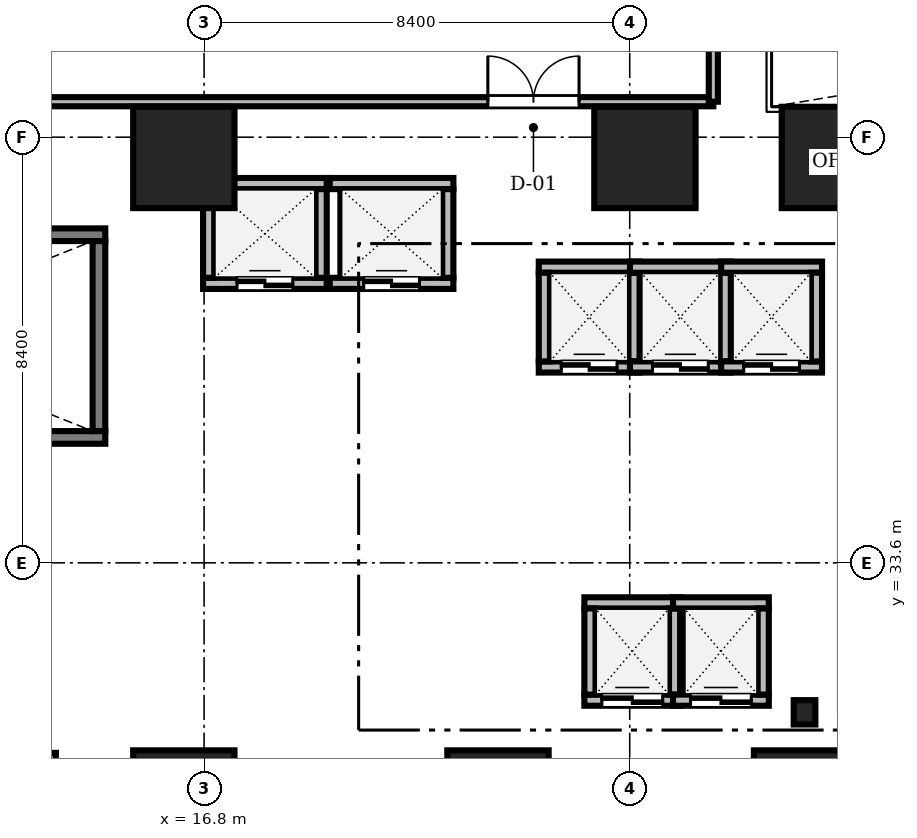
"""IFC4 building model, lengths in metres.
Left out: names, types, materials, properties, quantities, classifications, styles, units other than length and angle.
Written with IfcOpenShell. Run it as: python <this file> out.ifc"""

import sys

from ifc_helpers import new_model, si_unit, direction, frame, frame_2d, origin, origin_2d, place, context, subcontext, project, spatial, rectangle, i_section, extrude, source, transform, mapped, element, fill, save


model = new_model("IFC4")
c1 = context("Model", 3, precision=1e-05, world=origin(), true_north=direction((0.0, 1.0)))
c2 = subcontext(c1, "Body", "Model", "MODEL_VIEW")
j1 = project(units=[si_unit("LENGTHUNIT", "METRE"), si_unit("PLANEANGLEUNIT", "RADIAN")], contexts=[c1])
p1 = place(None, origin())
s1 = spatial("IfcSite", under=j1, at=p1, CompositionType="ELEMENT")
p2 = place(p1, origin())
s2 = spatial("IfcBuilding", under=s1, at=p2, CompositionType="ELEMENT")
p3 = place(p2, origin())
s3 = spatial("IfcBuildingStorey", under=s2, at=p3, CompositionType="ELEMENT", Elevation=0.0)
m1 = source(origin(), c2, "Body", "SweptSolid", [
    extrude(i_section(OverallWidth=0.428, OverallDepth=0.481, WebThickness=0.04, FlangeThickness=0.063, FilletRadius=0.015, at=origin_2d()), origin(), (0.0, 0.0, 1.0), 5.68),
])
p4 = place(p3, frame((28.65, 30.65, 0.0), z_axis=(0.0, 0.0, 1.0), x_axis=(1.0, 0.0, 0.0)))
e1 = element("IfcColumn", 1, at=p4, inside=s3, PredefinedType="COLUMN", context=c2, shape_type="MappedRepresentation", body=[
    mapped(m1, transform((0.0, 0.0, 0.0), scale=1.0)),
])
m2 = source(origin(), c2, "Body", "SweptSolid", [
    extrude(rectangle(XDim=2.0, YDim=2.0, at=origin_2d()), origin(), (0.0, 0.0, 1.0), 5.68),
])
for number, where, z_axis, x_axis in (
    (2, (16.4, 28.9, 0.0), (0.0, 0.0, 1.0), (1.0, 0.0, 0.0)),
    (3, (22.6, 28.9, 0.0), (0.0, 0.0, 1.0), (1.0, 0.0, 0.0)),
    (4, (28.65, 28.9, 0.0), (0.0, 0.0, 1.0), (1.0, 0.0, 0.0)),
    (5, (16.4, 41.6, 0.0), (0.0, 0.0, 1.0), (1.0, 0.0, 0.0)),
    (6, (25.5, 41.6, 0.0), (0.0, 0.0, 1.0), (1.0, 0.0, 0.0)),
    (7, (29.2, 41.6, 0.0), (0.0, 0.0, 1.0), (1.0, 0.0, 0.0)),
):
    element("IfcColumn", number, at=place(p3, frame(where, z_axis=z_axis, x_axis=x_axis)), inside=s3, PredefinedType="COLUMN", context=c2, shape_type="MappedRepresentation", body=[
        mapped(m2, transform((0.0, 0.0, 0.0), scale=1.0)),
    ])
m3 = source(origin(), c2, "Body", "SweptSolid", [
    extrude(rectangle(XDim=9.9, YDim=0.25, at=frame_2d((4.95, 0.0))), origin(), (0.0, 0.0, 1.0), 5.8),
])
for number, where, z_axis, x_axis in (
    (8, (4.95, 36.075, 0.0), (0.0, 0.0, 1.0), (1.0, 0.0, 0.0)),
    (9, (4.95, 40.075, 0.0), (0.0, 0.0, 1.0), (1.0, 0.0, 0.0)),
):
    element("IfcWall", number, at=place(p3, frame(where, z_axis=z_axis, x_axis=x_axis)), inside=s3, PredefinedType="SOLIDWALL", context=c2, shape_type="MappedRepresentation", body=[
        mapped(m3, transform((0.0, 0.0, 0.0), scale=1.0)),
    ])
m4 = source(origin(), c2, "Body", "SweptSolid", [
    extrude(rectangle(XDim=3.75, YDim=0.25, at=frame_2d((1.875, 0.0))), origin(), (0.0, 0.0, 1.0), 5.8),
])
p5 = place(p3, frame((14.725, 36.2, 0.0), z_axis=(0.0, 0.0, 1.0), x_axis=(0.0, 1.0, 0.0)))
e10 = element("IfcWall", 10, at=p5, inside=s3, PredefinedType="SOLIDWALL", context=c2, shape_type="MappedRepresentation", body=[
    mapped(m4, transform((0.0, 0.0, 0.0), scale=1.0)),
])
m5 = source(origin(), c2, "Body", "SweptSolid", [
    extrude(rectangle(XDim=2.44, YDim=0.22, at=frame_2d((1.22, 0.0))), origin(), (0.0, 0.0, 1.0), 5.68),
])
p6 = place(p3, frame((16.78, 39.115, 0.0), z_axis=(0.0, 0.0, 1.0), x_axis=(1.0, 0.0, 0.0)))
e11 = element("IfcWall", 11, at=p6, inside=s3, PredefinedType="SOLIDWALL", context=c2, shape_type="MappedRepresentation", body=[
    mapped(m5, transform((0.0, 0.0, 0.0), scale=1.0)),
])
m6 = source(origin(), c2, "Body", "SweptSolid", [
    extrude(rectangle(XDim=1.1, YDim=2.2, at=frame_2d((0.55, 1.1))), frame((0.0, 0.12, 0.0), z_axis=(0.0, -1.0, 0.0), x_axis=(1.0, 0.0, 0.0)), (0.0, 0.0, 1.0), 0.24),
])
p7 = place(p6, frame((0.67, 0.0, 0.0)))
e12 = element("IfcOpeningElement", 12, at=p7, cuts=e11, PredefinedType="OPENING", context=c2, shape_type="MappedRepresentation", body=[
    mapped(m6, transform((0.0, 0.0, 0.0), scale=1.0)),
])
p8 = place(p3, frame((16.78, 41.085, 0.0), z_axis=(0.0, 0.0, 1.0), x_axis=(1.0, 0.0, 0.0)))
e13 = element("IfcWall", 13, at=p8, inside=s3, PredefinedType="SOLIDWALL", context=c2, shape_type="MappedRepresentation", body=[
    mapped(m5, transform((0.0, 0.0, 0.0), scale=1.0)),
])
m7 = source(origin(), c2, "Body", "SweptSolid", [
    extrude(rectangle(XDim=1.75, YDim=0.22, at=frame_2d((0.875, 0.0))), origin(), (0.0, 0.0, 1.0), 5.68),
])
for number, where, z_axis, x_axis in (
    (14, (16.89, 39.225, 0.0), (0.0, 0.0, 1.0), (0.0, 1.0, 0.0)),
    (15, (19.11, 39.225, 0.0), (0.0, 0.0, 1.0), (0.0, 1.0, 0.0)),
):
    element("IfcWall", number, at=place(p3, frame(where, z_axis=z_axis, x_axis=x_axis)), inside=s3, PredefinedType="SOLIDWALL", context=c2, shape_type="MappedRepresentation", body=[
        mapped(m7, transform((0.0, 0.0, 0.0), scale=1.0)),
    ])
p9 = place(p3, frame((19.28, 39.115, 0.0), z_axis=(0.0, 0.0, 1.0), x_axis=(1.0, 0.0, 0.0)))
e16 = element("IfcWall", 16, at=p9, inside=s3, PredefinedType="SOLIDWALL", context=c2, shape_type="MappedRepresentation", body=[
    mapped(m5, transform((0.0, 0.0, 0.0), scale=1.0)),
])
p10 = place(p9, frame((0.67, 0.0, 0.0)))
e17 = element("IfcOpeningElement", 17, at=p10, cuts=e16, PredefinedType="OPENING", context=c2, shape_type="MappedRepresentation", body=[
    mapped(m6, transform((0.0, 0.0, 0.0), scale=1.0)),
])
p11 = place(p3, frame((19.28, 41.085, 0.0), z_axis=(0.0, 0.0, 1.0), x_axis=(1.0, 0.0, 0.0)))
e18 = element("IfcWall", 18, at=p11, inside=s3, PredefinedType="SOLIDWALL", context=c2, shape_type="MappedRepresentation", body=[
    mapped(m5, transform((0.0, 0.0, 0.0), scale=1.0)),
])
p12 = place(p3, frame((21.61, 39.225, 0.0), z_axis=(0.0, 0.0, 1.0), x_axis=(0.0, 1.0, 0.0)))
e19 = element("IfcWall", 19, at=p12, inside=s3, PredefinedType="SOLIDWALL", context=c2, shape_type="MappedRepresentation", body=[
    mapped(m7, transform((0.0, 0.0, 0.0), scale=1.0)),
])
m8 = source(origin(), c2, "Body", "SweptSolid", [
    extrude(rectangle(XDim=1.99, YDim=0.22, at=frame_2d((0.995, 0.0))), origin(), (0.0, 0.0, 1.0), 5.68),
])
p13 = place(p3, frame((23.405, 37.465, 0.0), z_axis=(0.0, 0.0, 1.0), x_axis=(1.0, 0.0, 0.0)))
e20 = element("IfcWall", 20, at=p13, inside=s3, PredefinedType="SOLIDWALL", context=c2, shape_type="MappedRepresentation", body=[
    mapped(m8, transform((0.0, 0.0, 0.0), scale=1.0)),
])
p14 = place(p13, frame((0.445, 0.0, 0.0)))
e21 = element("IfcOpeningElement", 21, at=p14, cuts=e20, PredefinedType="OPENING", context=c2, shape_type="MappedRepresentation", body=[
    mapped(m6, transform((0.0, 0.0, 0.0), scale=1.0)),
])
p15 = place(p3, frame((23.405, 39.435, 0.0), z_axis=(0.0, 0.0, 1.0), x_axis=(1.0, 0.0, 0.0)))
e22 = element("IfcWall", 22, at=p15, inside=s3, PredefinedType="SOLIDWALL", context=c2, shape_type="MappedRepresentation", body=[
    mapped(m8, transform((0.0, 0.0, 0.0), scale=1.0)),
])
for number, where, z_axis, x_axis in (
    (23, (23.515, 37.575, 0.0), (0.0, 0.0, 1.0), (0.0, 1.0, 0.0)),
    (24, (25.285, 37.575, 0.0), (0.0, 0.0, 1.0), (0.0, 1.0, 0.0)),
):
    element("IfcWall", number, at=place(p3, frame(where, z_axis=z_axis, x_axis=x_axis)), inside=s3, PredefinedType="SOLIDWALL", context=c2, shape_type="MappedRepresentation", body=[
        mapped(m7, transform((0.0, 0.0, 0.0), scale=1.0)),
    ])
p16 = place(p3, frame((25.205, 37.465, 0.0), z_axis=(0.0, 0.0, 1.0), x_axis=(1.0, 0.0, 0.0)))
e25 = element("IfcWall", 25, at=p16, inside=s3, PredefinedType="SOLIDWALL", context=c2, shape_type="MappedRepresentation", body=[
    mapped(m8, transform((0.0, 0.0, 0.0), scale=1.0)),
])
p17 = place(p16, frame((0.445, 0.0, 0.0)))
e26 = element("IfcOpeningElement", 26, at=p17, cuts=e25, PredefinedType="OPENING", context=c2, shape_type="MappedRepresentation", body=[
    mapped(m6, transform((0.0, 0.0, 0.0), scale=1.0)),
])
p18 = place(p3, frame((25.205, 39.435, 0.0), z_axis=(0.0, 0.0, 1.0), x_axis=(1.0, 0.0, 0.0)))
e27 = element("IfcWall", 27, at=p18, inside=s3, PredefinedType="SOLIDWALL", context=c2, shape_type="MappedRepresentation", body=[
    mapped(m8, transform((0.0, 0.0, 0.0), scale=1.0)),
])
p19 = place(p3, frame((27.085, 37.575, 0.0), z_axis=(0.0, 0.0, 1.0), x_axis=(0.0, 1.0, 0.0)))
e28 = element("IfcWall", 28, at=p19, inside=s3, PredefinedType="SOLIDWALL", context=c2, shape_type="MappedRepresentation", body=[
    mapped(m7, transform((0.0, 0.0, 0.0), scale=1.0)),
])
m9 = source(origin(), c2, "Body", "SweptSolid", [
    extrude(rectangle(XDim=1.99, YDim=0.22, at=frame_2d((0.995, 0.0))), origin(), (0.0, 0.0, 1.0), 5.68),
])
p20 = place(p3, frame((27.005, 37.465, 0.0), z_axis=(0.0, 0.0, 1.0), x_axis=(1.0, 0.0, 0.0)))
e29 = element("IfcWall", 29, at=p20, inside=s3, PredefinedType="SOLIDWALL", context=c2, shape_type="MappedRepresentation", body=[
    mapped(m9, transform((0.0, 0.0, 0.0), scale=1.0)),
])
p21 = place(p20, frame((0.445, 0.0, 0.0)))
e30 = element("IfcOpeningElement", 30, at=p21, cuts=e29, PredefinedType="OPENING", context=c2, shape_type="MappedRepresentation", body=[
    mapped(m6, transform((0.0, 0.0, 0.0), scale=1.0)),
])
p22 = place(p3, frame((27.005, 39.435, 0.0), z_axis=(0.0, 0.0, 1.0), x_axis=(1.0, 0.0, 0.0)))
e31 = element("IfcWall", 31, at=p22, inside=s3, PredefinedType="SOLIDWALL", context=c2, shape_type="MappedRepresentation", body=[
    mapped(m9, transform((0.0, 0.0, 0.0), scale=1.0)),
])
p23 = place(p3, frame((28.885, 37.575, 0.0), z_axis=(0.0, 0.0, 1.0), x_axis=(0.0, 1.0, 0.0)))
e32 = element("IfcWall", 32, at=p23, inside=s3, PredefinedType="SOLIDWALL", context=c2, shape_type="MappedRepresentation", body=[
    mapped(m7, transform((0.0, 0.0, 0.0), scale=1.0)),
])
m10 = source(origin(), c2, "Body", "SweptSolid", [
    extrude(rectangle(XDim=1.89, YDim=0.22, at=frame_2d((0.945, 0.0))), origin(), (0.0, 0.0, 1.0), 5.68),
])
p24 = place(p3, frame((24.305, 30.89, 0.0), z_axis=(0.0, 0.0, 1.0), x_axis=(1.0, 0.0, 0.0)))
e33 = element("IfcWall", 33, at=p24, inside=s3, PredefinedType="SOLIDWALL", context=c2, shape_type="MappedRepresentation", body=[
    mapped(m10, transform((0.0, 0.0, 0.0), scale=1.0)),
])
m11 = source(origin(), c2, "Body", "SweptSolid", [
    extrude(rectangle(XDim=1.2, YDim=2.25, at=frame_2d((0.6, 1.125))), frame((0.0, 0.12, 0.0), z_axis=(0.0, -1.0, 0.0), x_axis=(1.0, 0.0, 0.0)), (0.0, 0.0, 1.0), 0.24),
])
p25 = place(p24, frame((0.345, 0.0, 0.0)))
e34 = element("IfcOpeningElement", 34, at=p25, cuts=e33, PredefinedType="OPENING", context=c2, shape_type="MappedRepresentation", body=[
    mapped(m11, transform((0.0, 0.0, 0.0), scale=1.0)),
])
p26 = place(p3, frame((24.305, 32.81, 0.0), z_axis=(0.0, 0.0, 1.0), x_axis=(1.0, 0.0, 0.0)))
e35 = element("IfcWall", 35, at=p26, inside=s3, PredefinedType="SOLIDWALL", context=c2, shape_type="MappedRepresentation", body=[
    mapped(m10, transform((0.0, 0.0, 0.0), scale=1.0)),
])
m12 = source(origin(), c2, "Body", "SweptSolid", [
    extrude(rectangle(XDim=1.7, YDim=0.22, at=frame_2d((0.85, 0.0))), origin(), (0.0, 0.0, 1.0), 5.68),
])
for number, where, z_axis, x_axis in (
    (36, (24.415, 31.0, 0.0), (0.0, 0.0, 1.0), (0.0, 1.0, 0.0)),
    (37, (26.085, 31.0, 0.0), (0.0, 0.0, 1.0), (0.0, 1.0, 0.0)),
):
    element("IfcWall", number, at=place(p3, frame(where, z_axis=z_axis, x_axis=x_axis)), inside=s3, PredefinedType="SOLIDWALL", context=c2, shape_type="MappedRepresentation", body=[
        mapped(m12, transform((0.0, 0.0, 0.0), scale=1.0)),
    ])
p27 = place(p3, frame((26.055, 30.89, 0.0), z_axis=(0.0, 0.0, 1.0), x_axis=(1.0, 0.0, 0.0)))
e38 = element("IfcWall", 38, at=p27, inside=s3, PredefinedType="SOLIDWALL", context=c2, shape_type="MappedRepresentation", body=[
    mapped(m10, transform((0.0, 0.0, 0.0), scale=1.0)),
])
p28 = place(p27, frame((0.345, 0.0, 0.0)))
e39 = element("IfcOpeningElement", 39, at=p28, cuts=e38, PredefinedType="OPENING", context=c2, shape_type="MappedRepresentation", body=[
    mapped(m11, transform((0.0, 0.0, 0.0), scale=1.0)),
])
p29 = place(p3, frame((26.055, 32.81, 0.0), z_axis=(0.0, 0.0, 1.0), x_axis=(1.0, 0.0, 0.0)))
e40 = element("IfcWall", 40, at=p29, inside=s3, PredefinedType="SOLIDWALL", context=c2, shape_type="MappedRepresentation", body=[
    mapped(m10, transform((0.0, 0.0, 0.0), scale=1.0)),
])
p30 = place(p3, frame((27.835, 31.0, 0.0), z_axis=(0.0, 0.0, 1.0), x_axis=(0.0, 1.0, 0.0)))
e41 = element("IfcWall", 41, at=p30, inside=s3, PredefinedType="SOLIDWALL", context=c2, shape_type="MappedRepresentation", body=[
    mapped(m12, transform((0.0, 0.0, 0.0), scale=1.0)),
])
m13 = source(origin(), c2, "Body", "SweptSolid", [
    extrude(rectangle(XDim=26.038, YDim=0.18, at=frame_2d((13.019, 0.0))), origin(), (0.0, 0.0, 1.0), 5.072),
])
p31 = place(p3, frame((0.812, 42.7, 0.0), z_axis=(0.0, 0.0, 1.0), x_axis=(1.0, 0.0, 0.0)))
e42 = element("IfcWall", 42, at=p31, inside=s3, PredefinedType="PARTITIONING", context=c2, shape_type="MappedRepresentation", body=[
    mapped(m13, transform((0.0, 0.0, 0.0), scale=1.0)),
])
m14 = source(origin(), c2, "Body", "SweptSolid", [
    extrude(rectangle(XDim=1.8, YDim=2.4, at=frame_2d((0.9, 1.2))), frame((0.0, 0.1, 0.0), z_axis=(0.0, -1.0, 0.0), x_axis=(1.0, 0.0, 0.0)), (0.0, 0.0, 1.0), 0.2),
])
p32 = place(p31, frame((21.588, 0.0, 0.0)))
e43 = element("IfcOpeningElement", 43, at=p32, cuts=e42, PredefinedType="OPENING", context=c2, shape_type="MappedRepresentation", body=[
    mapped(m14, transform((0.0, 0.0, 0.0), scale=1.0)),
])
m15 = source(origin(), c2, "Body", "SweptSolid", [
    extrude(rectangle(XDim=2.3, YDim=0.25, at=frame_2d((1.15, 0.0))), origin(), (0.0, 0.0, 1.0), 5.68),
])
p33 = place(p3, frame((13.75, 27.55, 0.0), z_axis=(0.0, 0.0, 1.0), x_axis=(0.0, 1.0, 0.0)))
e44 = element("IfcWall", 44, at=p33, inside=s3, PredefinedType="SOLIDWALL", context=c2, shape_type="MappedRepresentation", body=[
    mapped(m15, transform((0.0, 0.0, 0.0), scale=1.0)),
])
m16 = source(origin(), c2, "Body", "SweptSolid", [
    extrude(rectangle(XDim=1.2, YDim=2.2, at=frame_2d((0.6, 1.1))), frame((0.0, 0.135, 0.0), z_axis=(0.0, -1.0, 0.0), x_axis=(1.0, 0.0, 0.0)), (0.0, 0.0, 1.0), 0.27),
])
p34 = place(p33, frame((0.9, 0.0, 0.0)))
e45 = element("IfcOpeningElement", 45, at=p34, cuts=e44, PredefinedType="OPENING", context=c2, shape_type="MappedRepresentation", body=[
    mapped(m16, transform((0.0, 0.0, 0.0), scale=1.0)),
])
m17 = source(origin(), c2, "Body", "SweptSolid", [
    extrude(rectangle(XDim=6.888, YDim=0.18, at=frame_2d((3.444, 0.0))), origin(), (0.0, 0.0, 1.0), 5.148),
])
p35 = place(p3, frame((26.85, 42.7, 0.0), z_axis=(0.0, 0.0, 1.0), x_axis=(0.0, 1.0, 0.0)))
e46 = element("IfcWall", 46, at=p35, inside=s3, PredefinedType="PARTITIONING", context=c2, shape_type="MappedRepresentation", body=[
    mapped(m17, transform((0.0, 0.0, 0.0), scale=1.0)),
])
m18 = source(origin(), c2, "Body", "SweptSolid", [
    extrude(rectangle(XDim=1.1, YDim=2.2, at=frame_2d((0.55, 1.1))), frame((0.0, 0.025, 0.0), z_axis=(0.0, -1.0, 0.0), x_axis=(1.0, 0.0, 0.0)), (0.0, 0.0, 1.0), 0.05),
])
p36 = place(p7, origin())
e47 = element("IfcDoor", 47, at=p36, inside=s3, OperationType="DOUBLE_DOOR_SLIDING", PredefinedType="DOOR", context=c2, shape_type="MappedRepresentation", body=[
    mapped(m18, transform((0.0, 0.0, 0.0), scale=1.0)),
])
fill(e12, e47)
p37 = place(p10, origin())
e48 = element("IfcDoor", 48, at=p37, inside=s3, OperationType="DOUBLE_DOOR_SLIDING", PredefinedType="DOOR", context=c2, shape_type="MappedRepresentation", body=[
    mapped(m18, transform((0.0, 0.0, 0.0), scale=1.0)),
])
fill(e17, e48)
p38 = place(p14, origin())
e49 = element("IfcDoor", 49, at=p38, inside=s3, OperationType="DOUBLE_DOOR_SLIDING", PredefinedType="DOOR", context=c2, shape_type="MappedRepresentation", body=[
    mapped(m18, transform((0.0, 0.0, 0.0), scale=1.0)),
])
fill(e21, e49)
p39 = place(p17, origin())
e50 = element("IfcDoor", 50, at=p39, inside=s3, OperationType="DOUBLE_DOOR_SLIDING", PredefinedType="DOOR", context=c2, shape_type="MappedRepresentation", body=[
    mapped(m18, transform((0.0, 0.0, 0.0), scale=1.0)),
])
fill(e26, e50)
p40 = place(p21, origin())
e51 = element("IfcDoor", 51, at=p40, inside=s3, OperationType="DOUBLE_DOOR_SLIDING", PredefinedType="DOOR", context=c2, shape_type="MappedRepresentation", body=[
    mapped(m18, transform((0.0, 0.0, 0.0), scale=1.0)),
])
fill(e30, e51)
m19 = source(origin(), c2, "Body", "SweptSolid", [
    extrude(rectangle(XDim=1.2, YDim=2.25, at=frame_2d((0.6, 1.125))), frame((0.0, 0.025, 0.0), z_axis=(0.0, -1.0, 0.0), x_axis=(1.0, 0.0, 0.0)), (0.0, 0.0, 1.0), 0.05),
])
p41 = place(p25, origin())
e52 = element("IfcDoor", 52, at=p41, inside=s3, OperationType="DOUBLE_DOOR_SLIDING", PredefinedType="DOOR", context=c2, shape_type="MappedRepresentation", body=[
    mapped(m19, transform((0.0, 0.0, 0.0), scale=1.0)),
])
fill(e34, e52)
p42 = place(p28, origin())
e53 = element("IfcDoor", 53, at=p42, inside=s3, OperationType="DOUBLE_DOOR_SLIDING", PredefinedType="DOOR", context=c2, shape_type="MappedRepresentation", body=[
    mapped(m19, transform((0.0, 0.0, 0.0), scale=1.0)),
])
fill(e39, e53)
m20 = source(origin(), c2, "Body", "SweptSolid", [
    extrude(rectangle(XDim=1.8, YDim=2.4, at=frame_2d((0.9, 1.2))), frame((0.0, 0.025, 0.0), z_axis=(0.0, -1.0, 0.0), x_axis=(1.0, 0.0, 0.0)), (0.0, 0.0, 1.0), 0.05),
])
p43 = place(p32, origin())
e54 = element("IfcDoor", 54, at=p43, inside=s3, OperationType="DOUBLE_DOOR_SINGLE_SWING", PredefinedType="DOOR", context=c2, shape_type="MappedRepresentation", body=[
    mapped(m20, transform((0.0, 0.0, 0.0), scale=1.0)),
])
fill(e43, e54)
save(model, sys.argv[1])
